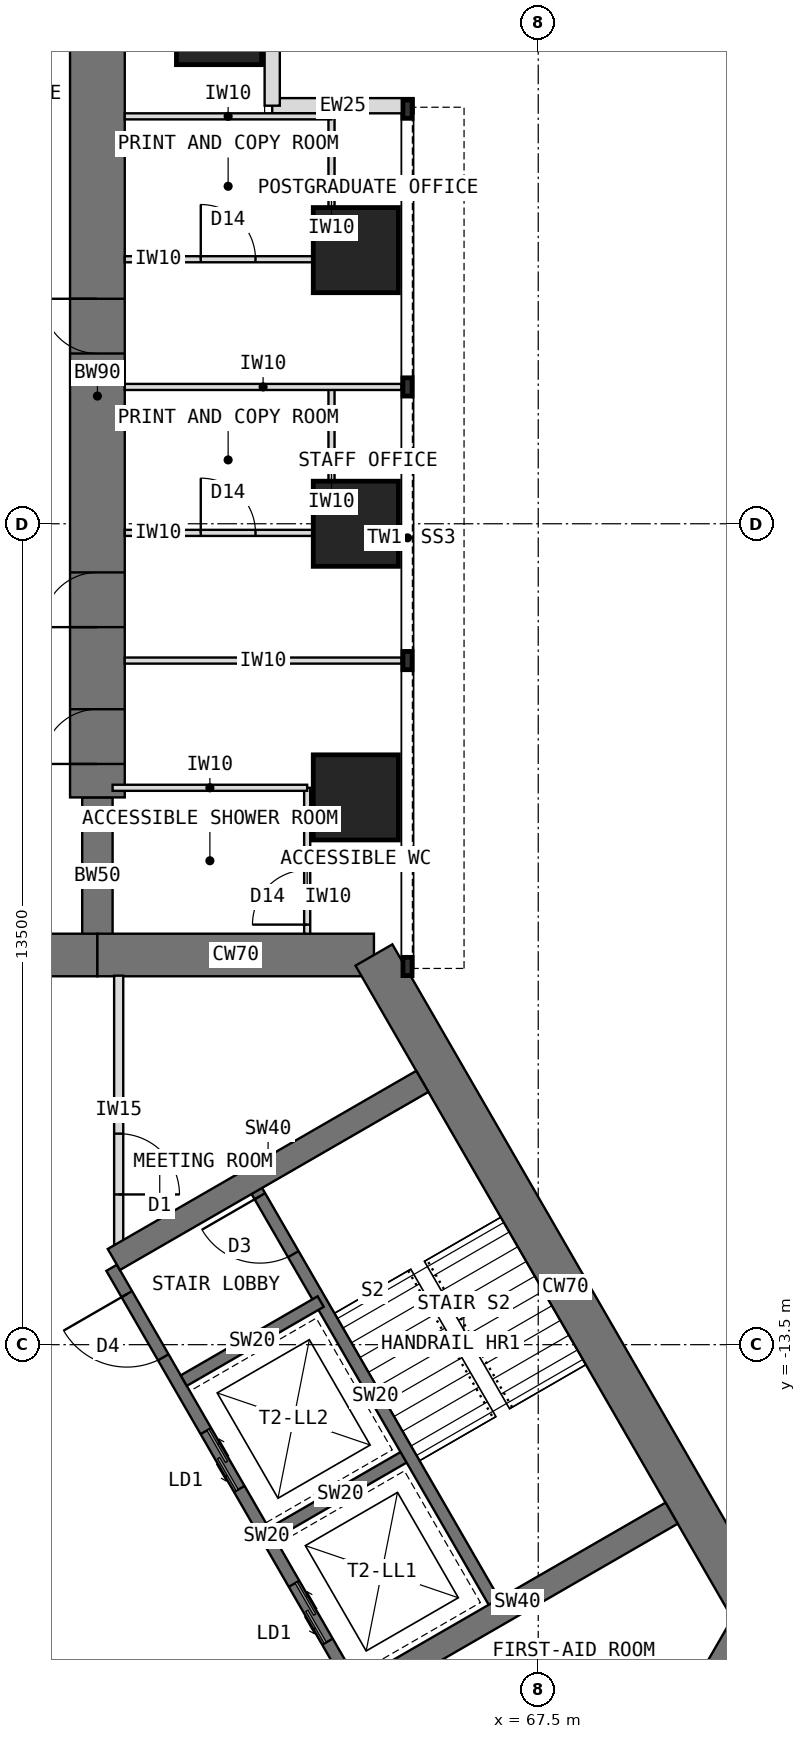
"""IFC4 building model, lengths in metres.
Left out: names, types, materials, properties, quantities, classifications, styles, units other than length and angle.
Written with IfcOpenShell. Run it as: python <this file> out.ifc"""

import sys

from ifc_helpers import new_model, si_unit, direction, frame, frame_2d, origin, origin_2d, place, context, subcontext, project, spatial, rectangle, extrude, element, fill, save


model = new_model("IFC4")
c1 = context("Model", 3, precision=1e-05, world=origin(), true_north=direction((0.0, 1.0)))
c2 = subcontext(c1, "Body", "Model", "MODEL_VIEW")
j1 = project(units=[si_unit("LENGTHUNIT", "METRE"), si_unit("PLANEANGLEUNIT", "RADIAN")], contexts=[c1])
p1 = place(None, origin())
s1 = spatial("IfcSite", under=j1, at=p1, CompositionType="ELEMENT")
p2 = place(p1, origin())
s2 = spatial("IfcBuilding", under=s1, at=p2, CompositionType="ELEMENT")
p3 = place(p2, frame((0.0, 0.0, 88.5)))
s3 = spatial("IfcBuildingStorey", under=s2, at=p3, CompositionType="ELEMENT", Elevation=88.5)
p4 = place(p3, frame((64.798, -7.092, 0.0), z_axis=(0.0, 0.0, 1.0), x_axis=(-1.0, 0.0, 0.0)))
e1 = element("IfcWall", 1, at=p4, inside=s3, PredefinedType="SHEAR", context=c2, shape_type="SweptSolid", body=[
    extrude(rectangle(XDim=4.548, YDim=0.7, at=frame_2d((2.274, 0.0))), origin(), (0.0, 0.0, 1.0), 4.0),
])
p5 = place(p3, frame((60.25, -7.092, 0.0), z_axis=(0.0, 0.0, 1.0), x_axis=(-1.0, 0.0, 0.0)))
e2 = element("IfcWall", 2, at=p5, inside=s3, PredefinedType="SHEAR", context=c2, shape_type="SweptSolid", body=[
    extrude(rectangle(XDim=3.5, YDim=0.7, at=frame_2d((1.75, 0.0))), origin(), (0.0, 0.0, 1.0), 4.0),
])
p6 = place(p5, frame((0.85, 0.0, 0.0)))
e3 = element("IfcOpeningElement", 3, at=p6, cuts=e2, PredefinedType="OPENING", context=c2, shape_type="SweptSolid", body=[
    extrude(rectangle(XDim=1.8, YDim=2.1, at=frame_2d((0.9, 1.05))), frame((0.0, 0.36, 0.0), z_axis=(0.0, -1.0, 0.0), x_axis=(1.0, 0.0, 0.0)), (0.0, 0.0, 1.0), 0.72),
])
p7 = place(p3, frame((68.822, -21.939, 0.0), z_axis=(0.0, 0.0, 1.0), x_axis=(0.500024481964, 0.866011268655, 0.0)))
e4 = element("IfcWall", 4, at=p7, inside=s3, PredefinedType="SHEAR", context=c2, shape_type="SweptSolid", body=[
    extrude(rectangle(XDim=4.548, YDim=0.7, at=frame_2d((2.274, 0.0))), origin(), (0.0, 0.0, 1.0), 4.0),
])
p8 = place(p3, frame((71.096, -18.0, 0.0), z_axis=(0.0, 0.0, 1.0), x_axis=(-0.500005998175, 0.866021940709, 0.0)))
e5 = element("IfcWall", 5, at=p8, inside=s3, PredefinedType="SHEAR", context=c2, shape_type="SweptSolid", body=[
    extrude(rectangle(XDim=12.596, YDim=0.7, at=frame_2d((6.298, 0.0))), origin(), (0.0, 0.0, 1.0), 4.0),
])
p9 = place(p3, frame((60.25, -7.092, 0.0), z_axis=(0.0, 0.0, 1.0), x_axis=(0.0, 1.0, 0.0)))
e6 = element("IfcWall", 6, at=p9, inside=s3, PredefinedType="SHEAR", context=c2, shape_type="SweptSolid", body=[
    extrude(rectangle(XDim=2.592, YDim=0.5, at=frame_2d((1.296, 0.0))), origin(), (0.0, 0.0, 1.0), 4.0),
])
p10 = place(p3, frame((60.25, -4.5, 0.0), z_axis=(0.0, 0.0, 1.0), x_axis=(0.0, 1.0, 0.0)))
e7 = element("IfcWall", 7, at=p10, inside=s3, PredefinedType="SHEAR", context=c2, shape_type="SweptSolid", body=[
    extrude(rectangle(XDim=13.2, YDim=0.9, at=frame_2d((6.6, 0.0))), origin(), (0.0, 0.0, 1.0), 4.0),
])
p11 = place(p10, frame((0.55, 0.0, 0.0)))
e8 = element("IfcOpeningElement", 8, at=p11, cuts=e7, PredefinedType="OPENING", context=c2, shape_type="SweptSolid", body=[
    extrude(rectangle(XDim=0.9, YDim=2.1, at=frame_2d((0.45, 1.05))), frame((0.0, 0.46, 0.0), z_axis=(0.0, -1.0, 0.0), x_axis=(1.0, 0.0, 0.0)), (0.0, 0.0, 1.0), 0.92),
])
p12 = place(p10, frame((2.8, 0.0, 0.0)))
e9 = element("IfcOpeningElement", 9, at=p12, cuts=e7, PredefinedType="OPENING", context=c2, shape_type="SweptSolid", body=[
    extrude(rectangle(XDim=0.9, YDim=2.1, at=frame_2d((0.45, 1.05))), frame((0.0, 0.46, 0.0), z_axis=(0.0, -1.0, 0.0), x_axis=(1.0, 0.0, 0.0)), (0.0, 0.0, 1.0), 0.92),
])
p13 = place(p10, frame((7.3, 0.0, 0.0)))
e10 = element("IfcOpeningElement", 10, at=p13, cuts=e7, PredefinedType="OPENING", context=c2, shape_type="SweptSolid", body=[
    extrude(rectangle(XDim=0.9, YDim=2.1, at=frame_2d((0.45, 1.05))), frame((0.0, 0.46, 0.0), z_axis=(0.0, -1.0, 0.0), x_axis=(1.0, 0.0, 0.0)), (0.0, 0.0, 1.0), 0.92),
])
for number, where, z_axis, x_axis in (
    (11, (64.5, -4.5, 0.0), (0.0, 0.0, 1.0), (1.0, 0.0, 0.0)),
    (12, (64.5, 0.0, 0.0), (0.0, 0.0, 1.0), (1.0, 0.0, 0.0)),
    (13, (64.5, 4.5, 0.0), (0.0, 0.0, 1.0), (1.0, 0.0, 0.0)),
    (14, (62.25, 8.25, 0.0), (0.0, 0.0, 1.0), (1.0, 0.0, 0.0)),
):
    element("IfcColumn", number, at=place(p3, frame(where, z_axis=z_axis, x_axis=x_axis)), inside=s3, PredefinedType="COLUMN", context=c2, shape_type="SweptSolid", body=[
        extrude(rectangle(XDim=1.4, YDim=1.4, at=origin_2d()), origin(), (0.0, 0.0, 1.0), 4.0),
    ])
for number, where, z_axis, x_axis in (
    (15, (65.45, 6.875, 0.0), (0.0, 0.0, 1.0), (-1.0, 0.0, 0.0)),
    (16, (63.125, 6.875, 0.0), (0.0, 0.0, 1.0), (0.0, 1.0, 0.0)),
):
    element("IfcWall", number, at=place(p3, frame(where, z_axis=z_axis, x_axis=x_axis)), inside=s3, PredefinedType="STANDARD", context=c2, shape_type="SweptSolid", body=[
        extrude(rectangle(XDim=2.325, YDim=0.25, at=frame_2d((1.163, 0.0))), origin(), (0.0, 0.0, 1.0), 3.7),
    ])
p14 = place(p3, frame((64.484, -19.164, 0.0), z_axis=(0.0, 0.0, 1.0), x_axis=(-0.49999894854, 0.866026010844, 0.0)))
e17 = element("IfcWall", 17, at=p14, inside=s3, PredefinedType="SHEAR", context=c2, shape_type="SweptSolid", body=[
    extrude(rectangle(XDim=8.0, YDim=0.2, at=frame_2d((4.0, 0.0))), origin(), (0.0, 0.0, 1.0), 4.0),
])
p15 = place(p14, frame((6.3, 0.0, 0.0)))
e18 = element("IfcOpeningElement", 18, at=p15, cuts=e17, PredefinedType="OPENING", context=c2, shape_type="SweptSolid", body=[
    extrude(rectangle(XDim=1.2, YDim=2.1, at=frame_2d((0.6, 1.05))), frame((0.0, 0.11, 0.0), z_axis=(0.0, -1.0, 0.0), x_axis=(1.0, 0.0, 0.0)), (0.0, 0.0, 1.0), 0.22),
])
p16 = place(p14, frame((0.9, 0.0, 0.0)))
e19 = element("IfcOpeningElement", 19, at=p16, cuts=e17, PredefinedType="OPENING", context=c2, shape_type="SweptSolid", body=[
    extrude(rectangle(XDim=1.1, YDim=2.2, at=frame_2d((0.55, 1.1))), frame((0.0, 0.11, 0.0), z_axis=(0.0, -1.0, 0.0), x_axis=(1.0, 0.0, 0.0)), (0.0, 0.0, 1.0), 0.22),
])
p17 = place(p14, frame((3.8, 0.0, 0.0)))
e20 = element("IfcOpeningElement", 20, at=p17, cuts=e17, PredefinedType="OPENING", context=c2, shape_type="SweptSolid", body=[
    extrude(rectangle(XDim=1.1, YDim=2.2, at=frame_2d((0.55, 1.1))), frame((0.0, 0.11, 0.0), z_axis=(0.0, -1.0, 0.0), x_axis=(1.0, 0.0, 0.0)), (0.0, 0.0, 1.0), 0.22),
])
p18 = place(p3, frame((63.12, -16.603, 0.0), z_axis=(0.0, 0.0, 1.0), x_axis=(0.866062058628, 0.499936506574, 0.0)))
e21 = element("IfcWall", 21, at=p18, inside=s3, PredefinedType="SHEAR", context=c2, shape_type="SweptSolid", body=[
    extrude(rectangle(XDim=2.6, YDim=0.2, at=frame_2d((1.3, 0.0))), origin(), (0.0, 0.0, 1.0), 4.0),
])
p19 = place(p3, frame((61.67, -14.091, 0.0), z_axis=(0.0, 0.0, 1.0), x_axis=(0.86603858612, 0.49997716683, 0.0)))
e22 = element("IfcWall", 22, at=p19, inside=s3, PredefinedType="SHEAR", context=c2, shape_type="SweptSolid", body=[
    extrude(rectangle(XDim=2.6, YDim=0.2, at=frame_2d((1.3, 0.0))), origin(), (0.0, 0.0, 1.0), 4.0),
])
p20 = place(p3, frame((66.822, -17.814, 0.0), z_axis=(0.0, 0.0, 1.0), x_axis=(-0.49999894854, 0.866026010844, 0.0)))
e23 = element("IfcWall", 23, at=p20, inside=s3, PredefinedType="SHEAR", context=c2, shape_type="SweptSolid", body=[
    extrude(rectangle(XDim=8.0, YDim=0.2, at=frame_2d((4.0, 0.0))), origin(), (0.0, 0.0, 1.0), 4.0),
])
p21 = place(p20, frame((6.7, 0.0, 0.0)))
e24 = element("IfcOpeningElement", 24, at=p21, cuts=e23, PredefinedType="OPENING", context=c2, shape_type="SweptSolid", body=[
    extrude(rectangle(XDim=1.1, YDim=2.1, at=frame_2d((0.55, 1.05))), frame((0.0, 0.11, 0.0), z_axis=(0.0, -1.0, 0.0), x_axis=(1.0, 0.0, 0.0)), (0.0, 0.0, 1.0), 0.22),
])
for number, where, z_axis, x_axis in (
    (25, (60.52, -12.099, 0.0), (0.0, 0.0, 1.0), (0.866, 0.5, 0.0)),
    (26, (64.62, -19.201, 0.0), (0.0, 0.0, 1.0), (0.866, 0.5, 0.0)),
):
    element("IfcWall", number, at=place(p3, frame(where, z_axis=z_axis, x_axis=x_axis)), inside=s3, PredefinedType="SHEAR", context=c2, shape_type="SweptSolid", body=[
        extrude(rectangle(XDim=5.858, YDim=0.4, at=frame_2d((2.929, 0.0))), origin(), (0.0, 0.0, 1.0), 4.0),
    ])
for number, where, z_axis, x_axis in (
    (27, (60.7, -2.25, 0.0), (0.0, 0.0, 1.0), (1.0, 0.0, 0.0)),
    (28, (60.7, 2.25, 0.0), (0.0, 0.0, 1.0), (1.0, 0.0, 0.0)),
):
    element("IfcWall", number, at=place(p3, frame(where, z_axis=z_axis, x_axis=x_axis)), inside=s3, PredefinedType="PARTITIONING", context=c2, shape_type="SweptSolid", body=[
        extrude(rectangle(XDim=4.55, YDim=0.1, at=frame_2d((2.275, 0.0))), origin(), (0.0, 0.0, 1.0), 3.7),
    ])
p22 = place(p3, frame((64.1, -0.15, 0.0), z_axis=(0.0, 0.0, 1.0), x_axis=(0.0, 1.0, 0.0)))
e29 = element("IfcWall", 29, at=p22, inside=s3, PredefinedType="PARTITIONING", context=c2, shape_type="SweptSolid", body=[
    extrude(rectangle(XDim=2.4, YDim=0.1, at=frame_2d((1.2, 0.0))), origin(), (0.0, 0.0, 1.0), 3.7),
])
p23 = place(p3, frame((60.7, -0.15, 0.0), z_axis=(0.0, 0.0, 1.0), x_axis=(1.0, 0.0, 0.0)))
e30 = element("IfcWall", 30, at=p23, inside=s3, PredefinedType="PARTITIONING", context=c2, shape_type="SweptSolid", body=[
    extrude(rectangle(XDim=3.4, YDim=0.1, at=frame_2d((1.7, 0.0))), origin(), (0.0, 0.0, 1.0), 3.7),
])
p24 = place(p23, frame((1.25, 0.0, 0.0)))
e31 = element("IfcOpeningElement", 31, at=p24, cuts=e30, PredefinedType="OPENING", context=c2, shape_type="SweptSolid", body=[
    extrude(rectangle(XDim=0.9, YDim=2.1, at=frame_2d((0.45, 1.05))), frame((0.0, 0.06, 0.0), z_axis=(0.0, -1.0, 0.0), x_axis=(1.0, 0.0, 0.0)), (0.0, 0.0, 1.0), 0.12),
])
p25 = place(p3, frame((64.1, 4.35, 0.0), z_axis=(0.0, 0.0, 1.0), x_axis=(0.0, 1.0, 0.0)))
e32 = element("IfcWall", 32, at=p25, inside=s3, PredefinedType="PARTITIONING", context=c2, shape_type="SweptSolid", body=[
    extrude(rectangle(XDim=2.4, YDim=0.1, at=frame_2d((1.2, 0.0))), origin(), (0.0, 0.0, 1.0), 3.7),
])
p26 = place(p3, frame((60.7, 4.35, 0.0), z_axis=(0.0, 0.0, 1.0), x_axis=(1.0, 0.0, 0.0)))
e33 = element("IfcWall", 33, at=p26, inside=s3, PredefinedType="PARTITIONING", context=c2, shape_type="SweptSolid", body=[
    extrude(rectangle(XDim=3.4, YDim=0.1, at=frame_2d((1.7, 0.0))), origin(), (0.0, 0.0, 1.0), 3.7),
])
p27 = place(p26, frame((1.25, 0.0, 0.0)))
e34 = element("IfcOpeningElement", 34, at=p27, cuts=e33, PredefinedType="OPENING", context=c2, shape_type="SweptSolid", body=[
    extrude(rectangle(XDim=0.9, YDim=2.1, at=frame_2d((0.45, 1.05))), frame((0.0, 0.06, 0.0), z_axis=(0.0, -1.0, 0.0), x_axis=(1.0, 0.0, 0.0)), (0.0, 0.0, 1.0), 0.12),
])
p28 = place(p3, frame((60.7, 6.7, 0.0), z_axis=(0.0, 0.0, 1.0), x_axis=(1.0, 0.0, 0.0)))
e35 = element("IfcWall", 35, at=p28, inside=s3, PredefinedType="PARTITIONING", context=c2, shape_type="SweptSolid", body=[
    extrude(rectangle(XDim=3.4, YDim=0.1, at=frame_2d((1.7, 0.0))), origin(), (0.0, 0.0, 1.0), 3.7),
])
p29 = place(p3, frame((63.7, -6.742, 0.0), z_axis=(0.0, 0.0, 1.0), x_axis=(0.0, 1.0, 0.0)))
e36 = element("IfcWall", 36, at=p29, inside=s3, PredefinedType="PARTITIONING", context=c2, shape_type="SweptSolid", body=[
    extrude(rectangle(XDim=2.4, YDim=0.1, at=frame_2d((1.2, 0.0))), origin(), (0.0, 0.0, 1.0), 3.7),
])
p30 = place(p29, frame((0.15, 0.0, 0.0)))
e37 = element("IfcOpeningElement", 37, at=p30, cuts=e36, PredefinedType="OPENING", context=c2, shape_type="SweptSolid", body=[
    extrude(rectangle(XDim=0.9, YDim=2.1, at=frame_2d((0.45, 1.05))), frame((0.0, 0.06, 0.0), z_axis=(0.0, -1.0, 0.0), x_axis=(1.0, 0.0, 0.0)), (0.0, 0.0, 1.0), 0.12),
])
p31 = place(p3, frame((60.5, -4.342, 0.0), z_axis=(0.0, 0.0, 1.0), x_axis=(1.0, 0.0, 0.0)))
e38 = element("IfcWall", 38, at=p31, inside=s3, PredefinedType="PARTITIONING", context=c2, shape_type="SweptSolid", body=[
    extrude(rectangle(XDim=3.2, YDim=0.1, at=frame_2d((1.6, 0.0))), origin(), (0.0, 0.0, 1.0), 3.7),
])
p32 = place(p3, frame((60.6, -7.432, 0.0), z_axis=(0.0, 0.0, 1.0), x_axis=(0.0, -1.0, 0.0)))
e39 = element("IfcWall", 39, at=p32, inside=s3, PredefinedType="PARTITIONING", context=c2, shape_type="SweptSolid", body=[
    extrude(rectangle(XDim=4.426, YDim=0.15, at=frame_2d((2.213, 0.0))), origin(), (0.0, 0.0, 1.0), 3.7),
])
p33 = place(p32, frame((2.598, 0.0, 0.0)))
e40 = element("IfcOpeningElement", 40, at=p33, cuts=e39, PredefinedType="OPENING", context=c2, shape_type="SweptSolid", body=[
    extrude(rectangle(XDim=1.0, YDim=2.1, at=frame_2d((0.5, 1.05))), frame((0.0, 0.085, 0.0), z_axis=(0.0, -1.0, 0.0), x_axis=(1.0, 0.0, 0.0)), (0.0, 0.0, 1.0), 0.17),
])
p34 = place(p15, origin())
e41 = element("IfcDoor", 41, at=p34, inside=s3, OperationType="SINGLE_SWING_RIGHT", PredefinedType="DOOR", context=c2, shape_type="SweptSolid", body=[
    extrude(rectangle(XDim=1.2, YDim=2.1, at=frame_2d((0.6, 1.05))), frame((0.0, 0.025, 0.0), z_axis=(0.0, -1.0, 0.0), x_axis=(1.0, 0.0, 0.0)), (0.0, 0.0, 1.0), 0.05),
])
fill(e18, e41)
p35 = place(p16, origin())
e42 = element("IfcDoor", 42, at=p35, inside=s3, OperationType="DOUBLE_DOOR_SLIDING", PredefinedType="DOOR", context=c2, shape_type="SweptSolid", body=[
    extrude(rectangle(XDim=1.1, YDim=2.2, at=frame_2d((0.55, 1.1))), frame((0.0, 0.025, 0.0), z_axis=(0.0, -1.0, 0.0), x_axis=(1.0, 0.0, 0.0)), (0.0, 0.0, 1.0), 0.05),
])
fill(e19, e42)
p36 = place(p17, origin())
e43 = element("IfcDoor", 43, at=p36, inside=s3, OperationType="DOUBLE_DOOR_SLIDING", PredefinedType="DOOR", context=c2, shape_type="SweptSolid", body=[
    extrude(rectangle(XDim=1.1, YDim=2.2, at=frame_2d((0.55, 1.1))), frame((0.0, 0.025, 0.0), z_axis=(0.0, -1.0, 0.0), x_axis=(1.0, 0.0, 0.0)), (0.0, 0.0, 1.0), 0.05),
])
fill(e20, e43)
p37 = place(p21, origin())
e44 = element("IfcDoor", 44, at=p37, inside=s3, OperationType="SINGLE_SWING_RIGHT", PredefinedType="DOOR", context=c2, shape_type="SweptSolid", body=[
    extrude(rectangle(XDim=1.1, YDim=2.1, at=frame_2d((0.55, 1.05))), frame((0.0, 0.025, 0.0), z_axis=(0.0, -1.0, 0.0), x_axis=(1.0, 0.0, 0.0)), (0.0, 0.0, 1.0), 0.05),
])
fill(e24, e44)
p38 = place(p24, origin())
e45 = element("IfcDoor", 45, at=p38, inside=s3, OperationType="SINGLE_SWING_LEFT", PredefinedType="DOOR", context=c2, shape_type="SweptSolid", body=[
    extrude(rectangle(XDim=0.9, YDim=2.1, at=frame_2d((0.45, 1.05))), frame((0.0, 0.025, 0.0), z_axis=(0.0, -1.0, 0.0), x_axis=(1.0, 0.0, 0.0)), (0.0, 0.0, 1.0), 0.05),
])
fill(e31, e45)
p39 = place(p27, origin())
e46 = element("IfcDoor", 46, at=p39, inside=s3, OperationType="SINGLE_SWING_LEFT", PredefinedType="DOOR", context=c2, shape_type="SweptSolid", body=[
    extrude(rectangle(XDim=0.9, YDim=2.1, at=frame_2d((0.45, 1.05))), frame((0.0, 0.025, 0.0), z_axis=(0.0, -1.0, 0.0), x_axis=(1.0, 0.0, 0.0)), (0.0, 0.0, 1.0), 0.05),
])
fill(e34, e46)
p40 = place(p30, origin())
e47 = element("IfcDoor", 47, at=p40, inside=s3, OperationType="SINGLE_SWING_LEFT", PredefinedType="DOOR", context=c2, shape_type="SweptSolid", body=[
    extrude(rectangle(XDim=0.9, YDim=2.1, at=frame_2d((0.45, 1.05))), frame((0.0, 0.025, 0.0), z_axis=(0.0, -1.0, 0.0), x_axis=(1.0, 0.0, 0.0)), (0.0, 0.0, 1.0), 0.05),
])
fill(e37, e47)
p41 = place(p33, origin())
e48 = element("IfcDoor", 48, at=p41, inside=s3, OperationType="SINGLE_SWING_RIGHT", PredefinedType="DOOR", context=c2, shape_type="SweptSolid", body=[
    extrude(rectangle(XDim=1.0, YDim=2.1, at=frame_2d((0.5, 1.05))), frame((0.0, 0.025, 0.0), z_axis=(0.0, -1.0, 0.0), x_axis=(1.0, 0.0, 0.0)), (0.0, 0.0, 1.0), 0.05),
])
fill(e40, e48)
p42 = place(p11, origin())
e49 = element("IfcDoor", 49, at=p42, inside=s3, OperationType="SINGLE_SWING_LEFT", PredefinedType="DOOR", context=c2, shape_type="SweptSolid", body=[
    extrude(rectangle(XDim=0.82, YDim=2.06, at=frame_2d((0.45, 1.03))), frame((0.0, 0.025, 0.0), z_axis=(0.0, -1.0, 0.0), x_axis=(1.0, 0.0, 0.0)), (0.0, 0.0, 1.0), 0.05),
    extrude(rectangle(XDim=0.04, YDim=2.1, at=frame_2d((0.02, 1.05))), frame((0.0, 0.45, 0.0), z_axis=(0.0, -1.0, 0.0), x_axis=(1.0, 0.0, 0.0)), (0.0, 0.0, 1.0), 0.899),
    extrude(rectangle(XDim=0.04, YDim=2.1, at=frame_2d((0.88, 1.05))), frame((0.0, 0.45, 0.0), z_axis=(0.0, -1.0, 0.0), x_axis=(1.0, 0.0, 0.0)), (0.0, 0.0, 1.0), 0.899),
    extrude(rectangle(XDim=0.82, YDim=0.04, at=frame_2d((0.45, 2.08))), frame((0.0, 0.45, 0.0), z_axis=(0.0, -1.0, 0.0), x_axis=(1.0, 0.0, 0.0)), (0.0, 0.0, 1.0), 0.899),
])
fill(e8, e49)
p43 = place(p12, origin())
e50 = element("IfcDoor", 50, at=p43, inside=s3, OperationType="SINGLE_SWING_LEFT", PredefinedType="DOOR", context=c2, shape_type="SweptSolid", body=[
    extrude(rectangle(XDim=0.82, YDim=2.06, at=frame_2d((0.45, 1.03))), frame((0.0, 0.025, 0.0), z_axis=(0.0, -1.0, 0.0), x_axis=(1.0, 0.0, 0.0)), (0.0, 0.0, 1.0), 0.05),
    extrude(rectangle(XDim=0.04, YDim=2.1, at=frame_2d((0.02, 1.05))), frame((0.0, 0.45, 0.0), z_axis=(0.0, -1.0, 0.0), x_axis=(1.0, 0.0, 0.0)), (0.0, 0.0, 1.0), 0.899),
    extrude(rectangle(XDim=0.04, YDim=2.1, at=frame_2d((0.88, 1.05))), frame((0.0, 0.45, 0.0), z_axis=(0.0, -1.0, 0.0), x_axis=(1.0, 0.0, 0.0)), (0.0, 0.0, 1.0), 0.899),
    extrude(rectangle(XDim=0.82, YDim=0.04, at=frame_2d((0.45, 2.08))), frame((0.0, 0.45, 0.0), z_axis=(0.0, -1.0, 0.0), x_axis=(1.0, 0.0, 0.0)), (0.0, 0.0, 1.0), 0.899),
])
fill(e9, e50)
p44 = place(p13, origin())
e51 = element("IfcDoor", 51, at=p44, inside=s3, OperationType="SINGLE_SWING_RIGHT", PredefinedType="DOOR", context=c2, shape_type="SweptSolid", body=[
    extrude(rectangle(XDim=0.82, YDim=2.06, at=frame_2d((0.45, 1.03))), frame((0.0, 0.025, 0.0), z_axis=(0.0, -1.0, 0.0), x_axis=(1.0, 0.0, 0.0)), (0.0, 0.0, 1.0), 0.05),
    extrude(rectangle(XDim=0.04, YDim=2.1, at=frame_2d((0.02, 1.05))), frame((0.0, 0.45, 0.0), z_axis=(0.0, -1.0, 0.0), x_axis=(1.0, 0.0, 0.0)), (0.0, 0.0, 1.0), 0.899),
    extrude(rectangle(XDim=0.04, YDim=2.1, at=frame_2d((0.88, 1.05))), frame((0.0, 0.45, 0.0), z_axis=(0.0, -1.0, 0.0), x_axis=(1.0, 0.0, 0.0)), (0.0, 0.0, 1.0), 0.899),
    extrude(rectangle(XDim=0.82, YDim=0.04, at=frame_2d((0.45, 2.08))), frame((0.0, 0.45, 0.0), z_axis=(0.0, -1.0, 0.0), x_axis=(1.0, 0.0, 0.0)), (0.0, 0.0, 1.0), 0.899),
])
fill(e10, e51)
save(model, sys.argv[1])
